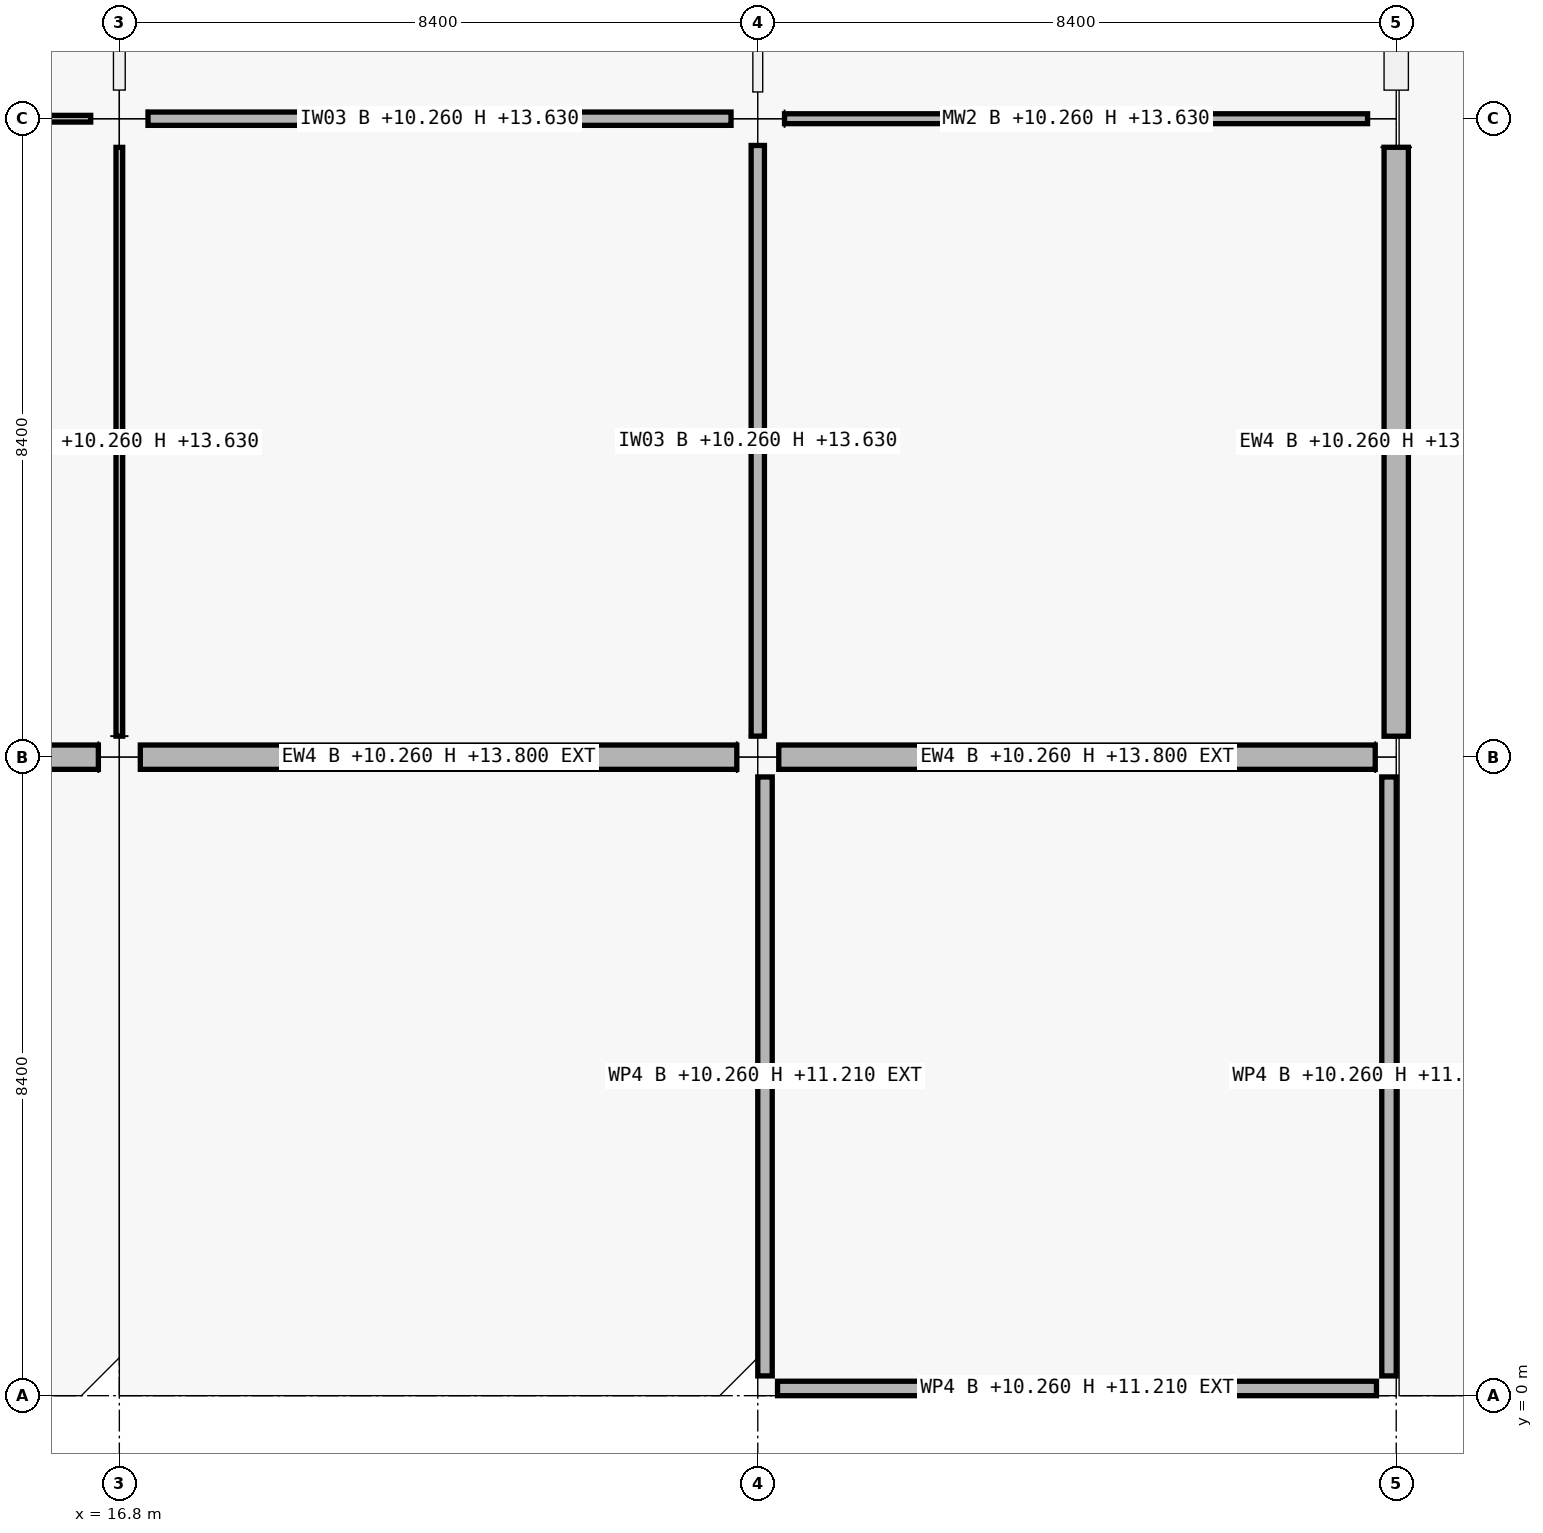
"""IFC4 building model, lengths in metres.
Left out: names, types, materials, properties, quantities, classifications, styles, units other than length and angle.
Written with IfcOpenShell. Run it as: python <this file> out.ifc"""

import sys

from ifc_helpers import new_model, si_unit, direction, frame, frame_2d, origin, origin_2d, place, context, subcontext, project, spatial, rectangle, extrude, element, fill, save


model = new_model("IFC4")
c1 = context("Model", 3, precision=1e-05, world=origin(), true_north=direction((0.0, 1.0)))
c2 = subcontext(c1, "Body", "Model", "MODEL_VIEW")
j1 = project(units=[si_unit("LENGTHUNIT", "METRE"), si_unit("PLANEANGLEUNIT", "RADIAN")], contexts=[c1])
p1 = place(None, origin())
s1 = spatial("IfcSite", under=j1, at=p1, CompositionType="ELEMENT")
p2 = place(p1, origin())
s2 = spatial("IfcBuilding", under=s1, at=p2, CompositionType="ELEMENT")
p3 = place(p2, frame((0.0, 0.0, 10.26)))
s3 = spatial("IfcBuildingStorey", under=s2, at=p3, CompositionType="ELEMENT", Elevation=10.26)
p4 = place(p3, frame((16.8, 8.4, 0.0), z_axis=(0.0, 0.0, 1.0), x_axis=(1.0, 0.0, 0.0)))
e1 = element("IfcColumn", 1, at=p4, inside=s3, PredefinedType="COLUMN", context=c2, shape_type="SweptSolid", body=[
    extrude(rectangle(XDim=0.55, YDim=0.55, at=origin_2d()), origin(), (0.0, 0.0, 1.0), 4.25),
])
p5 = place(p3, frame((16.8, 16.8, 0.0), z_axis=(0.0, 0.0, 1.0), x_axis=(1.0, 0.0, 0.0)))
e2 = element("IfcColumn", 2, at=p5, inside=s3, PredefinedType="COLUMN", context=c2, shape_type="SweptSolid", body=[
    extrude(rectangle(XDim=0.75, YDim=0.75, at=origin_2d()), origin(), (0.0, 0.0, 1.0), 4.5),
])
p6 = place(p3, frame((25.2, 8.4, 0.0), z_axis=(0.0, 0.0, 1.0), x_axis=(1.0, 0.0, 0.0)))
e3 = element("IfcColumn", 3, at=p6, inside=s3, PredefinedType="COLUMN", context=c2, shape_type="SweptSolid", body=[
    extrude(rectangle(XDim=0.55, YDim=0.55, at=origin_2d()), origin(), (0.0, 0.0, 1.0), 4.25),
])
p7 = place(p3, frame((25.2, 16.8, 0.0), z_axis=(0.0, 0.0, 1.0), x_axis=(1.0, 0.0, 0.0)))
e4 = element("IfcColumn", 4, at=p7, inside=s3, PredefinedType="COLUMN", context=c2, shape_type="SweptSolid", body=[
    extrude(rectangle(XDim=0.7, YDim=0.7, at=origin_2d()), origin(), (0.0, 0.0, 1.0), 4.5),
])
p8 = place(p3, frame((33.6, 8.4, 0.0), z_axis=(0.0, 0.0, 1.0), x_axis=(1.0, 0.0, 0.0)))
e5 = element("IfcColumn", 5, at=p8, inside=s3, PredefinedType="COLUMN", context=c2, shape_type="SweptSolid", body=[
    extrude(rectangle(XDim=0.55, YDim=0.55, at=origin_2d()), origin(), (0.0, 0.0, 1.0), 4.25),
])
p9 = place(p3, frame((33.6, 16.8, 0.0), z_axis=(0.0, 0.0, 1.0), x_axis=(1.0, 0.0, 0.0)))
e6 = element("IfcColumn", 6, at=p9, inside=s3, PredefinedType="COLUMN", context=c2, shape_type="SweptSolid", body=[
    extrude(rectangle(XDim=0.75, YDim=0.75, at=origin_2d()), origin(), (0.0, 0.0, 1.0), 4.5),
])
p10 = place(p3, frame((16.524, 8.4, 0.0), z_axis=(0.0, 0.0, 1.0), x_axis=(-1.0, 0.0, 0.0)))
e7 = element("IfcWall", 7, at=p10, inside=s3, PredefinedType="SOLIDWALL", context=c2, shape_type="SweptSolid", body=[
    extrude(rectangle(XDim=7.848, YDim=0.32, at=frame_2d((3.924, 0.0))), origin(), (0.0, 0.0, 1.0), 3.54),
])
p11 = place(p10, frame((2.999, 0.0, 0.0)))
e8 = element("IfcOpeningElement", 8, at=p11, cuts=e7, PredefinedType="OPENING", context=c2, shape_type="SweptSolid", body=[
    extrude(rectangle(XDim=1.85, YDim=2.2, at=frame_2d((0.925, 1.1))), frame((0.0, 0.16, 0.0), z_axis=(0.0, -1.0, 0.0), x_axis=(1.0, 0.0, 0.0)), (0.0, 0.0, 1.0), 0.32),
])
p12 = place(p3, frame((24.924, 8.4, 0.0), z_axis=(0.0, 0.0, 1.0), x_axis=(-1.0, 0.0, 0.0)))
e9 = element("IfcWall", 9, at=p12, inside=s3, PredefinedType="SOLIDWALL", context=c2, shape_type="SweptSolid", body=[
    extrude(rectangle(XDim=7.848, YDim=0.32, at=frame_2d((3.924, 0.0))), origin(), (0.0, 0.0, 1.0), 3.54),
])
p13 = place(p12, frame((3.099, 0.0, 0.0)))
e10 = element("IfcOpeningElement", 10, at=p13, cuts=e9, PredefinedType="OPENING", context=c2, shape_type="SweptSolid", body=[
    extrude(rectangle(XDim=1.65, YDim=2.2, at=frame_2d((0.825, 1.1))), frame((0.0, 0.16, 0.0), z_axis=(0.0, -1.0, 0.0), x_axis=(1.0, 0.0, 0.0)), (0.0, 0.0, 1.0), 0.32),
])
p14 = place(p3, frame((33.324, 8.4, 0.0), z_axis=(0.0, 0.0, 1.0), x_axis=(-1.0, 0.0, 0.0)))
e11 = element("IfcWall", 11, at=p14, inside=s3, PredefinedType="SOLIDWALL", context=c2, shape_type="SweptSolid", body=[
    extrude(rectangle(XDim=7.848, YDim=0.32, at=frame_2d((3.924, 0.0))), origin(), (0.0, 0.0, 1.0), 3.54),
])
p15 = place(p14, frame((3.174, 0.0, 0.9)))
e12 = element("IfcOpeningElement", 12, at=p15, cuts=e11, PredefinedType="OPENING", context=c2, shape_type="SweptSolid", body=[
    extrude(rectangle(XDim=1.5, YDim=1.8, at=frame_2d((0.75, 0.9))), frame((0.0, 0.16, 0.0), z_axis=(0.0, -1.0, 0.0), x_axis=(1.0, 0.0, 0.0)), (0.0, 0.0, 1.0), 0.32),
])
p16 = place(p3, frame((33.6, 16.424, 0.0), z_axis=(0.0, 0.0, 1.0), x_axis=(0.0, -1.0, 0.0)))
e13 = element("IfcWall", 13, at=p16, inside=s3, PredefinedType="SOLIDWALL", context=c2, shape_type="SweptSolid", body=[
    extrude(rectangle(XDim=7.748, YDim=0.32, at=frame_2d((3.874, 0.0))), origin(), (0.0, 0.0, 1.0), 3.54),
])
p17 = place(p16, frame((3.074, 0.0, 0.9)))
e14 = element("IfcOpeningElement", 14, at=p17, cuts=e13, PredefinedType="OPENING", context=c2, shape_type="SweptSolid", body=[
    extrude(rectangle(XDim=1.6, YDim=2.1, at=frame_2d((0.8, 1.05))), frame((0.0, 0.16, 0.0), z_axis=(0.0, -1.0, 0.0), x_axis=(1.0, 0.0, 0.0)), (0.0, 0.0, 1.0), 0.32),
])
p18 = place(p3, frame((33.6, 24.849, 0.0), z_axis=(0.0, 0.0, 1.0), x_axis=(0.0, -1.0, 0.0)))
e15 = element("IfcWall", 15, at=p18, inside=s3, PredefinedType="SOLIDWALL", context=c2, shape_type="SweptSolid", body=[
    extrude(rectangle(XDim=7.673, YDim=0.32, at=frame_2d((3.836, 0.0))), origin(), (0.0, 0.0, 1.0), 3.54),
])
p19 = place(p18, frame((2.837, 0.0, 0.9)))
e16 = element("IfcOpeningElement", 16, at=p19, cuts=e15, PredefinedType="OPENING", context=c2, shape_type="SweptSolid", body=[
    extrude(rectangle(XDim=2.0, YDim=2.1, at=frame_2d((1.0, 1.05))), frame((0.0, 0.16, 0.0), z_axis=(0.0, -1.0, 0.0), x_axis=(1.0, 0.0, 0.0)), (0.0, 0.0, 1.0), 0.32),
])
p20 = place(p3, frame((33.34, 0.095, 0.0), z_axis=(0.0, 0.0, 1.0), x_axis=(-1.0, 0.0, 0.0)))
e17 = element("IfcWall", 17, at=p20, inside=s3, PredefinedType="PARAPET", context=c2, shape_type="SweptSolid", body=[
    extrude(rectangle(XDim=7.88, YDim=0.19, at=frame_2d((3.94, 0.0))), origin(), (0.0, 0.0, 1.0), 0.95),
])
for number, where, z_axis, x_axis in (
    (18, (25.295, 0.26, 0.0), (0.0, 0.0, 1.0), (0.0, 1.0, 0.0)),
    (19, (33.505, 8.14, 0.0), (0.0, 0.0, 1.0), (0.0, -1.0, 0.0)),
):
    element("IfcWall", number, at=place(p3, frame(where, z_axis=z_axis, x_axis=x_axis)), inside=s3, PredefinedType="PARAPET", context=c2, shape_type="SweptSolid", body=[
        extrude(rectangle(XDim=7.88, YDim=0.19, at=frame_2d((3.94, 0.0))), origin(), (0.0, 0.0, 1.0), 0.95),
    ])
p21 = place(p3, frame((8.752, 16.8, 0.0), z_axis=(0.0, 0.0, 1.0), x_axis=(1.0, 0.0, 0.0)))
e20 = element("IfcWall", 20, at=p21, inside=s3, PredefinedType="PARTITIONING", context=c2, shape_type="SweptSolid", body=[
    extrude(rectangle(XDim=7.671, YDim=0.088, at=frame_2d((3.835, 0.0))), origin(), (0.0, 0.0, 1.0), 3.37),
])
p22 = place(p21, frame((3.351, 0.0, 0.0)))
e21 = element("IfcOpeningElement", 21, at=p22, cuts=e20, PredefinedType="OPENING", context=c2, shape_type="SweptSolid", body=[
    extrude(rectangle(XDim=0.97, YDim=2.12, at=frame_2d((0.485, 1.06))), frame((0.0, 0.044, 0.0), z_axis=(0.0, -1.0, 0.0), x_axis=(1.0, 0.0, 0.0)), (0.0, 0.0, 1.0), 0.088),
])
p23 = place(p3, frame((17.177, 16.8, 0.0), z_axis=(0.0, 0.0, 1.0), x_axis=(1.0, 0.0, 0.0)))
e22 = element("IfcWall", 22, at=p23, inside=s3, PredefinedType="PARTITIONING", context=c2, shape_type="SweptSolid", body=[
    extrude(rectangle(XDim=7.671, YDim=0.175, at=frame_2d((3.835, 0.0))), origin(), (0.0, 0.0, 1.0), 3.37),
])
p24 = place(p23, frame((3.371, 0.0, 0.0)))
e23 = element("IfcOpeningElement", 23, at=p24, cuts=e22, PredefinedType="OPENING", context=c2, shape_type="SweptSolid", body=[
    extrude(rectangle(XDim=0.93, YDim=2.12, at=frame_2d((0.465, 1.06))), frame((0.0, 0.087, 0.0), z_axis=(0.0, -1.0, 0.0), x_axis=(1.0, 0.0, 0.0)), (0.0, 0.0, 1.0), 0.175),
])
p25 = place(p3, frame((25.552, 16.8, 0.0), z_axis=(0.0, 0.0, 1.0), x_axis=(1.0, 0.0, 0.0)))
e24 = element("IfcWall", 24, at=p25, inside=s3, PredefinedType="MOVABLE", context=c2, shape_type="SweptSolid", body=[
    extrude(rectangle(XDim=7.671, YDim=0.13, at=frame_2d((3.835, 0.0))), origin(), (0.0, 0.0, 1.0), 3.37),
])
p26 = place(p25, frame((3.296, 0.0, 0.0)))
e25 = element("IfcOpeningElement", 25, at=p26, cuts=e24, PredefinedType="OPENING", context=c2, shape_type="SweptSolid", body=[
    extrude(rectangle(XDim=1.08, YDim=2.25, at=frame_2d((0.54, 1.125))), frame((0.0, 0.065, 0.0), z_axis=(0.0, -1.0, 0.0), x_axis=(1.0, 0.0, 0.0)), (0.0, 0.0, 1.0), 0.13),
])
p27 = place(p3, frame((16.8, 8.677, 0.0), z_axis=(0.0, 0.0, 1.0), x_axis=(0.0, 1.0, 0.0)))
e26 = element("IfcWall", 26, at=p27, inside=s3, PredefinedType="PARTITIONING", context=c2, shape_type="SweptSolid", body=[
    extrude(rectangle(XDim=7.746, YDim=0.088, at=frame_2d((3.873, 0.0))), origin(), (0.0, 0.0, 1.0), 3.37),
])
p28 = place(p27, frame((3.353, 0.0, 0.0)))
e27 = element("IfcOpeningElement", 27, at=p28, cuts=e26, PredefinedType="OPENING", context=c2, shape_type="SweptSolid", body=[
    extrude(rectangle(XDim=1.04, YDim=2.2, at=frame_2d((0.52, 1.1))), frame((0.0, 0.044, 0.0), z_axis=(0.0, -1.0, 0.0), x_axis=(1.0, 0.0, 0.0)), (0.0, 0.0, 1.0), 0.088),
])
p29 = place(p3, frame((16.8, 17.177, 0.0), z_axis=(0.0, 0.0, 1.0), x_axis=(0.0, 1.0, 0.0)))
e28 = element("IfcWall", 28, at=p29, inside=s3, PredefinedType="PARTITIONING", context=c2, shape_type="SweptSolid", body=[
    extrude(rectangle(XDim=7.671, YDim=0.155, at=frame_2d((3.835, 0.0))), origin(), (0.0, 0.0, 1.0), 3.37),
])
p30 = place(p29, frame((3.325, 0.0, 0.0)))
e29 = element("IfcOpeningElement", 29, at=p30, cuts=e28, PredefinedType="OPENING", context=c2, shape_type="SweptSolid", body=[
    extrude(rectangle(XDim=1.02, YDim=2.2, at=frame_2d((0.51, 1.1))), frame((0.0, 0.078, 0.0), z_axis=(0.0, -1.0, 0.0), x_axis=(1.0, 0.0, 0.0)), (0.0, 0.0, 1.0), 0.155),
])
p31 = place(p3, frame((25.2, 8.677, 0.0), z_axis=(0.0, 0.0, 1.0), x_axis=(0.0, 1.0, 0.0)))
e30 = element("IfcWall", 30, at=p31, inside=s3, PredefinedType="PARTITIONING", context=c2, shape_type="SweptSolid", body=[
    extrude(rectangle(XDim=7.771, YDim=0.175, at=frame_2d((3.885, 0.0))), origin(), (0.0, 0.0, 1.0), 3.37),
])
p32 = place(p31, frame((3.385, 0.0, 0.0)))
e31 = element("IfcOpeningElement", 31, at=p32, cuts=e30, PredefinedType="OPENING", context=c2, shape_type="SweptSolid", body=[
    extrude(rectangle(XDim=1.0, YDim=2.2, at=frame_2d((0.5, 1.1))), frame((0.0, 0.087, 0.0), z_axis=(0.0, -1.0, 0.0), x_axis=(1.0, 0.0, 0.0)), (0.0, 0.0, 1.0), 0.175),
])
p33 = place(p3, frame((25.2, 17.152, 0.0), z_axis=(0.0, 0.0, 1.0), x_axis=(0.0, 1.0, 0.0)))
e32 = element("IfcWall", 32, at=p33, inside=s3, PredefinedType="MOVABLE", context=c2, shape_type="SweptSolid", body=[
    extrude(rectangle(XDim=7.671, YDim=0.13, at=frame_2d((3.835, 0.0))), origin(), (0.0, 0.0, 1.0), 3.37),
])
p34 = place(p33, frame((3.346, 0.0, 0.0)))
e33 = element("IfcOpeningElement", 33, at=p34, cuts=e32, PredefinedType="OPENING", context=c2, shape_type="SweptSolid", body=[
    extrude(rectangle(XDim=0.98, YDim=2.18, at=frame_2d((0.49, 1.09))), frame((0.0, 0.065, 0.0), z_axis=(0.0, -1.0, 0.0), x_axis=(1.0, 0.0, 0.0)), (0.0, 0.0, 1.0), 0.13),
])
p35 = place(p13, origin())
e34 = element("IfcDoor", 34, at=p35, inside=s3, OperationType="DOUBLE_DOOR_SINGLE_SWING", PredefinedType="DOOR", context=c2, shape_type="SweptSolid", body=[
    extrude(rectangle(XDim=1.65, YDim=2.2, at=frame_2d((0.825, 1.1))), frame((0.0, 0.025, 0.0), z_axis=(0.0, -1.0, 0.0), x_axis=(1.0, 0.0, 0.0)), (0.0, 0.0, 1.0), 0.05),
])
fill(e10, e34)
p36 = place(p15, origin())
e35 = element("IfcWindow", 35, at=p36, inside=s3, PartitioningType="SINGLE_PANEL", PredefinedType="WINDOW", context=c2, shape_type="SweptSolid", body=[
    extrude(rectangle(XDim=1.5, YDim=1.8, at=frame_2d((0.75, 0.9))), frame((0.0, 0.03, 0.0), z_axis=(0.0, -1.0, 0.0), x_axis=(1.0, 0.0, 0.0)), (0.0, 0.0, 1.0), 0.06),
])
fill(e12, e35)
p37 = place(p17, origin())
e36 = element("IfcWindow", 36, at=p37, inside=s3, PartitioningType="SINGLE_PANEL", PredefinedType="WINDOW", context=c2, shape_type="SweptSolid", body=[
    extrude(rectangle(XDim=1.6, YDim=2.1, at=frame_2d((0.8, 1.05))), frame((0.0, 0.03, 0.0), z_axis=(0.0, -1.0, 0.0), x_axis=(1.0, 0.0, 0.0)), (0.0, 0.0, 1.0), 0.06),
])
fill(e14, e36)
p38 = place(p24, origin())
e37 = element("IfcDoor", 37, at=p38, inside=s3, OperationType="SINGLE_SWING_LEFT", PredefinedType="DOOR", context=c2, shape_type="SweptSolid", body=[
    extrude(rectangle(XDim=0.93, YDim=2.12, at=frame_2d((0.465, 1.06))), frame((0.0, 0.025, 0.0), z_axis=(0.0, -1.0, 0.0), x_axis=(1.0, 0.0, 0.0)), (0.0, 0.0, 1.0), 0.05),
])
fill(e23, e37)
p39 = place(p26, origin())
e38 = element("IfcDoor", 38, at=p39, inside=s3, OperationType="SINGLE_SWING_RIGHT", PredefinedType="DOOR", context=c2, shape_type="SweptSolid", body=[
    extrude(rectangle(XDim=1.08, YDim=2.25, at=frame_2d((0.54, 1.125))), frame((0.0, 0.025, 0.0), z_axis=(0.0, -1.0, 0.0), x_axis=(1.0, 0.0, 0.0)), (0.0, 0.0, 1.0), 0.05),
])
fill(e25, e38)
p40 = place(p28, origin())
e39 = element("IfcDoor", 39, at=p40, inside=s3, OperationType="SINGLE_SWING_RIGHT", PredefinedType="DOOR", context=c2, shape_type="SweptSolid", body=[
    extrude(rectangle(XDim=1.04, YDim=2.2, at=frame_2d((0.52, 1.1))), frame((0.0, 0.025, 0.0), z_axis=(0.0, -1.0, 0.0), x_axis=(1.0, 0.0, 0.0)), (0.0, 0.0, 1.0), 0.05),
])
fill(e27, e39)
p41 = place(p32, origin())
e40 = element("IfcDoor", 40, at=p41, inside=s3, OperationType="SINGLE_SWING_RIGHT", PredefinedType="DOOR", context=c2, shape_type="SweptSolid", body=[
    extrude(rectangle(XDim=1.0, YDim=2.2, at=frame_2d((0.5, 1.1))), frame((0.0, 0.025, 0.0), z_axis=(0.0, -1.0, 0.0), x_axis=(1.0, 0.0, 0.0)), (0.0, 0.0, 1.0), 0.05),
])
fill(e31, e40)
save(model, sys.argv[1])
